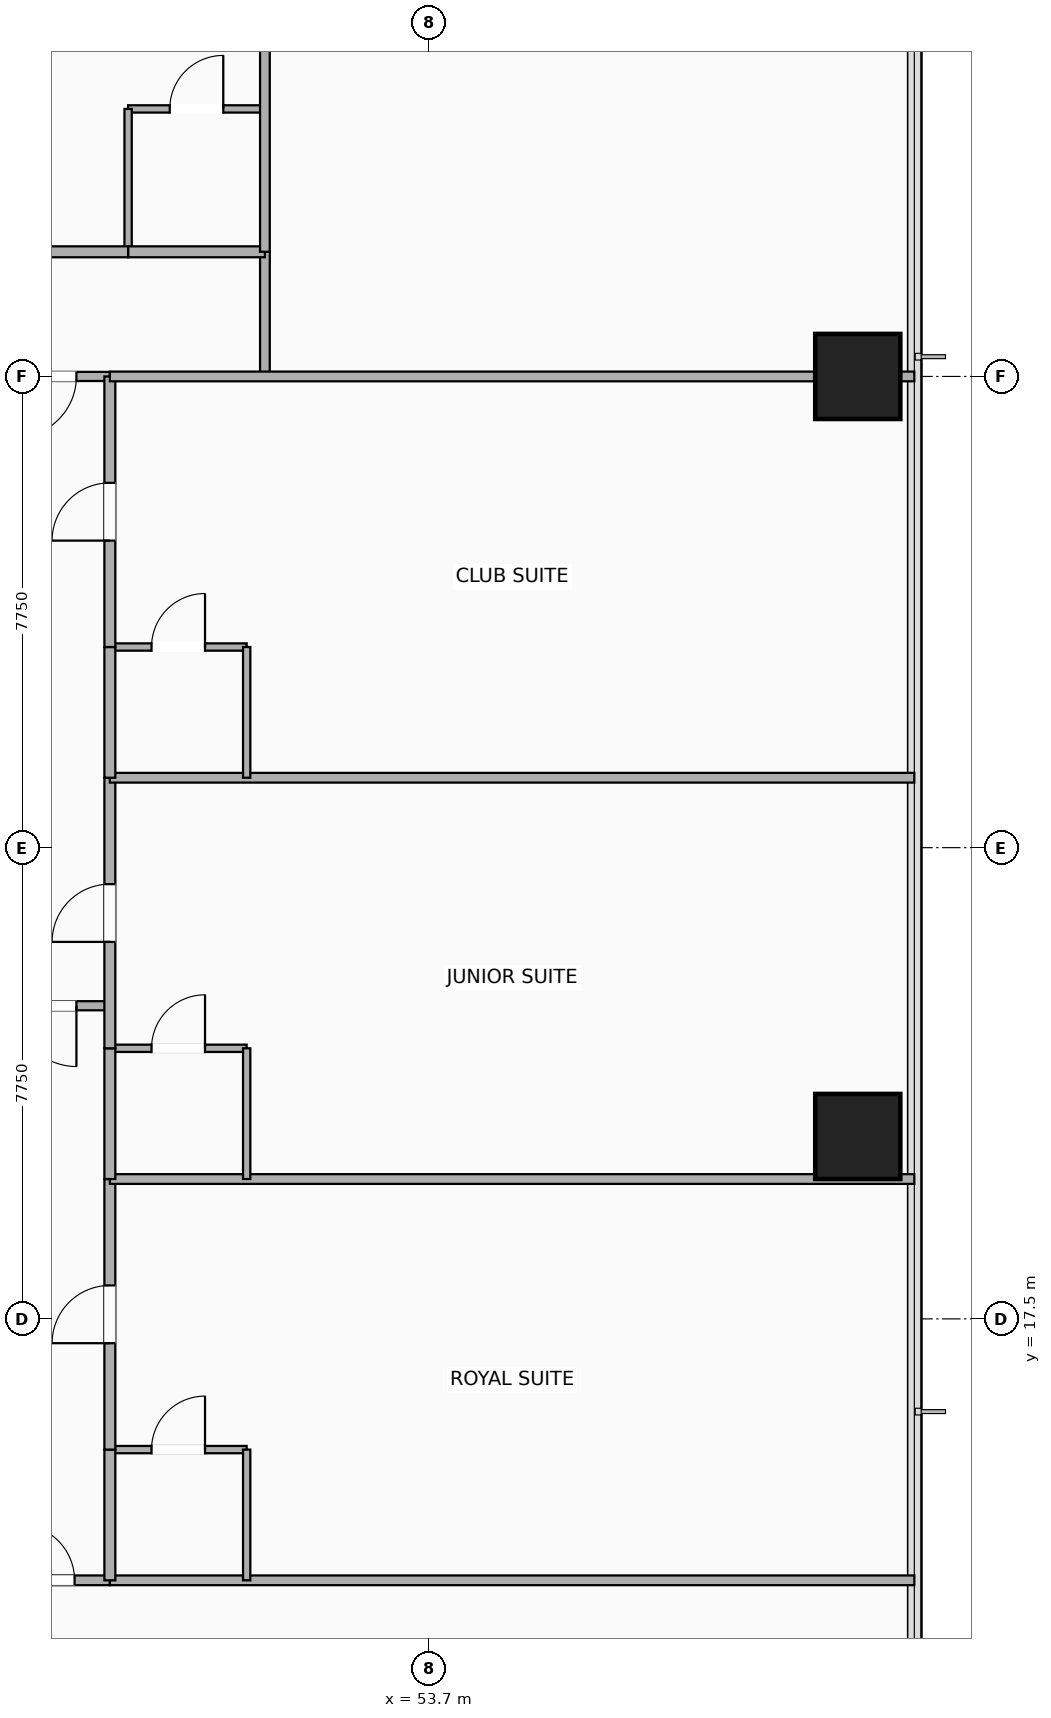
"""IFC4 building model, lengths in metres.
Left out: names, types, materials, properties, quantities, classifications, styles, units other than length and angle.
Written with IfcOpenShell. Run it as: python <this file> out.ifc"""

import sys

from ifc_helpers import new_model, si_unit, direction, frame, frame_2d, origin, origin_2d, place, context, subcontext, project, spatial, rectangle, extrude, element, fill, save


model = new_model("IFC4")
c1 = context("Model", 3, precision=1e-05, world=origin(), true_north=direction((0.0, 1.0)))
c2 = subcontext(c1, "Body", "Model", "MODEL_VIEW")
j1 = project(units=[si_unit("LENGTHUNIT", "METRE"), si_unit("PLANEANGLEUNIT", "RADIAN")], contexts=[c1])
p1 = place(None, origin())
s1 = spatial("IfcSite", under=j1, at=p1, CompositionType="ELEMENT")
p2 = place(p1, origin())
s2 = spatial("IfcBuilding", under=s1, at=p2, CompositionType="ELEMENT")
p3 = place(p2, frame((0.0, 0.0, 71.9)))
s3 = spatial("IfcBuildingStorey", under=s2, at=p3, CompositionType="ELEMENT", Elevation=71.9)
for number, where, z_axis, x_axis in (
    (1, (60.75, 20.5, -0.28), (0.0, 0.0, 1.0), (1.0, 0.0, 0.0)),
    (2, (60.75, 33.0, -0.28), (0.0, 0.0, 1.0), (1.0, 0.0, 0.0)),
):
    element("IfcColumn", number, at=place(p3, frame(where, z_axis=z_axis, x_axis=x_axis)), inside=s3, PredefinedType="COLUMN", context=c2, shape_type="SweptSolid", body=[
        extrude(rectangle(XDim=1.4, YDim=1.4, at=origin_2d()), origin(), (0.0, 0.0, 1.0), 3.46),
    ])
p4 = place(p3, frame((44.8, 13.2, 0.0), z_axis=(0.0, 0.0, 1.0), x_axis=(1.0, 0.0, 0.0)))
e3 = element("IfcWall", 3, at=p4, inside=s3, PredefinedType="PARTITIONING", context=c2, shape_type="SweptSolid", body=[
    extrude(rectangle(XDim=3.65, YDim=0.16, at=frame_2d((1.825, 0.0))), origin(), (0.0, 0.0, 1.0), 2.47),
])
p5 = place(p4, frame((3.07, 0.0, 0.0), z_axis=(0.0, 0.0, 1.0), x_axis=(-1.0, 0.0, 0.0)))
e4 = element("IfcOpeningElement", 4, at=p5, cuts=e3, PredefinedType="OPENING", context=c2, shape_type="SweptSolid", body=[
    extrude(rectangle(XDim=0.92, YDim=2.08, at=frame_2d((0.46, 1.04))), frame((0.0, 0.09, 0.0), z_axis=(0.0, -1.0, 0.0), x_axis=(1.0, 0.0, 0.0)), (0.0, 0.0, 1.0), 0.18),
])
p6 = place(p3, frame((46.45, 22.65, 0.0), z_axis=(0.0, 0.0, 1.0), x_axis=(1.0, 0.0, 0.0)))
e5 = element("IfcWall", 5, at=p6, inside=s3, PredefinedType="PARTITIONING", context=c2, shape_type="SweptSolid", body=[
    extrude(rectangle(XDim=2.0, YDim=0.15, at=frame_2d((1.0, 0.0))), origin(), (0.0, 0.0, 1.0), 3.18),
])
p7 = place(p6, frame((0.45, 0.0, 0.0)))
e6 = element("IfcOpeningElement", 6, at=p7, cuts=e5, PredefinedType="OPENING", context=c2, shape_type="SweptSolid", body=[
    extrude(rectangle(XDim=1.0, YDim=2.15, at=frame_2d((0.5, 1.075))), frame((0.0, 0.085, 0.0), z_axis=(0.0, -1.0, 0.0), x_axis=(1.0, 0.0, 0.0)), (0.0, 0.0, 1.0), 0.17),
])
p8 = place(p3, frame((46.45, 33.0, 0.0), z_axis=(0.0, 0.0, 1.0), x_axis=(1.0, 0.0, 0.0)))
e7 = element("IfcWall", 7, at=p8, inside=s3, PredefinedType="PARTITIONING", context=c2, shape_type="SweptSolid", body=[
    extrude(rectangle(XDim=2.0, YDim=0.15, at=frame_2d((1.0, 0.0))), origin(), (0.0, 0.0, 1.0), 2.47),
])
p9 = place(p8, frame((0.45, 0.0, 0.0)))
e8 = element("IfcOpeningElement", 8, at=p9, cuts=e7, PredefinedType="OPENING", context=c2, shape_type="SweptSolid", body=[
    extrude(rectangle(XDim=1.0, YDim=2.15, at=frame_2d((0.5, 1.075))), frame((0.0, 0.085, 0.0), z_axis=(0.0, -1.0, 0.0), x_axis=(1.0, 0.0, 0.0)), (0.0, 0.0, 1.0), 0.17),
])
p10 = place(p3, frame((51.0, 33.0, 0.0), z_axis=(0.0, 0.0, 1.0), x_axis=(0.0, 1.0, 0.0)))
e9 = element("IfcWall", 9, at=p10, inside=s3, PredefinedType="PARTITIONING", context=c2, shape_type="SweptSolid", body=[
    extrude(rectangle(XDim=2.05, YDim=0.16, at=frame_2d((1.025, 0.0))), origin(), (0.0, 0.0, 1.0), 2.47),
])
p11 = place(p3, frame((48.75, 37.4, 0.0), z_axis=(0.0, 0.0, 1.0), x_axis=(1.0, 0.0, 0.0)))
e10 = element("IfcWall", 10, at=p11, inside=s3, PredefinedType="PARTITIONING", context=c2, shape_type="SweptSolid", body=[
    extrude(rectangle(XDim=2.25, YDim=0.12, at=frame_2d((1.125, 0.0))), origin(), (0.0, 0.0, 1.0), 3.18),
])
p12 = place(p11, frame((1.565, 0.0, 0.0), z_axis=(0.0, 0.0, 1.0), x_axis=(-1.0, 0.0, 0.0)))
e11 = element("IfcOpeningElement", 11, at=p12, cuts=e10, PredefinedType="OPENING", context=c2, shape_type="SweptSolid", body=[
    extrude(rectangle(XDim=0.88, YDim=2.08, at=frame_2d((0.44, 1.04))), frame((0.0, 0.07, 0.0), z_axis=(0.0, -1.0, 0.0), x_axis=(1.0, 0.0, 0.0)), (0.0, 0.0, 1.0), 0.14),
])
p13 = place(p3, frame((48.75, 35.05, 0.0), z_axis=(0.0, 0.0, 1.0), x_axis=(0.0, 1.0, 0.0)))
e12 = element("IfcWall", 12, at=p13, inside=s3, PredefinedType="PARTITIONING", context=c2, shape_type="SweptSolid", body=[
    extrude(rectangle(XDim=2.35, YDim=0.12, at=frame_2d((1.175, 0.0))), origin(), (0.0, 0.0, 1.0), 3.18),
])
p14 = place(p3, frame((48.75, 35.05, 0.0), z_axis=(0.0, 0.0, 1.0), x_axis=(1.0, 0.0, 0.0)))
e13 = element("IfcWall", 13, at=p14, inside=s3, PredefinedType="PARTITIONING", context=c2, shape_type="SweptSolid", body=[
    extrude(rectangle(XDim=2.25, YDim=0.18, at=frame_2d((1.125, 0.0))), origin(), (0.0, 0.0, 1.0), 3.18),
])
p15 = place(p3, frame((40.413, 35.05, 0.0), z_axis=(0.0, 0.0, 1.0), x_axis=(1.0, 0.0, 0.0)))
e14 = element("IfcWall", 14, at=p15, inside=s3, PredefinedType="PARTITIONING", context=c2, shape_type="SweptSolid", body=[
    extrude(rectangle(XDim=8.337, YDim=0.18, at=frame_2d((4.168, 0.0))), origin(), (0.0, 0.0, 1.0), 2.47),
])
p16 = place(p15, frame((3.693, 0.0, 0.0)))
e15 = element("IfcOpeningElement", 15, at=p16, cuts=e14, PredefinedType="OPENING", context=c2, shape_type="SweptSolid", body=[
    extrude(rectangle(XDim=0.95, YDim=2.15, at=frame_2d((0.475, 1.075))), frame((0.0, 0.1, 0.0), z_axis=(0.0, -1.0, 0.0), x_axis=(1.0, 0.0, 0.0)), (0.0, 0.0, 1.0), 0.2),
])
p17 = place(p3, frame((51.0, 35.05, 0.0), z_axis=(0.0, 0.0, 1.0), x_axis=(0.0, 1.0, 0.0)))
e16 = element("IfcWall", 16, at=p17, inside=s3, PredefinedType="PARTITIONING", context=c2, shape_type="SweptSolid", body=[
    extrude(rectangle(XDim=13.33, YDim=0.16, at=frame_2d((6.665, 0.0))), origin(), (0.0, 0.0, 1.0), 3.18),
])
p18 = place(p3, frame((48.45, 13.2, 0.0), z_axis=(0.0, 0.0, 1.0), x_axis=(1.0, 0.0, 0.0)))
e17 = element("IfcWall", 17, at=p18, inside=s3, PredefinedType="PARTITIONING", context=c2, shape_type="SweptSolid", body=[
    extrude(rectangle(XDim=13.23, YDim=0.16, at=frame_2d((6.615, 0.0))), origin(), (0.0, 0.0, 1.0), 2.543),
])
p19 = place(p3, frame((48.45, 15.35, 0.0), z_axis=(0.0, 0.0, 1.0), x_axis=(1.0, 0.0, 0.0)))
e18 = element("IfcWall", 18, at=p19, inside=s3, PredefinedType="PARTITIONING", context=c2, shape_type="SweptSolid", body=[
    extrude(rectangle(XDim=2.25, YDim=0.12, at=frame_2d((1.125, 0.0))), origin(), (0.0, 0.0, 1.0), 3.18),
])
p20 = place(p19, frame((1.565, 0.0, 0.0), z_axis=(0.0, 0.0, 1.0), x_axis=(-1.0, 0.0, 0.0)))
e19 = element("IfcOpeningElement", 19, at=p20, cuts=e18, PredefinedType="OPENING", context=c2, shape_type="SweptSolid", body=[
    extrude(rectangle(XDim=0.88, YDim=2.08, at=frame_2d((0.44, 1.04))), frame((0.0, 0.07, 0.0), z_axis=(0.0, -1.0, 0.0), x_axis=(1.0, 0.0, 0.0)), (0.0, 0.0, 1.0), 0.14),
])
p21 = place(p3, frame((50.7, 13.2, 0.0), z_axis=(0.0, 0.0, 1.0), x_axis=(0.0, 1.0, 0.0)))
e20 = element("IfcWall", 20, at=p21, inside=s3, PredefinedType="PARTITIONING", context=c2, shape_type="SweptSolid", body=[
    extrude(rectangle(XDim=2.15, YDim=0.12, at=frame_2d((1.075, 0.0))), origin(), (0.0, 0.0, 1.0), 2.862),
])
p22 = place(p3, frame((48.45, 13.2, 0.0), z_axis=(0.0, 0.0, 1.0), x_axis=(0.0, 1.0, 0.0)))
e21 = element("IfcWall", 21, at=p22, inside=s3, PredefinedType="PARTITIONING", context=c2, shape_type="SweptSolid", body=[
    extrude(rectangle(XDim=2.15, YDim=0.18, at=frame_2d((1.075, 0.0))), origin(), (0.0, 0.0, 1.0), 2.862),
])
p23 = place(p3, frame((48.45, 15.35, 0.0), z_axis=(0.0, 0.0, 1.0), x_axis=(0.0, 1.0, 0.0)))
e22 = element("IfcWall", 22, at=p23, inside=s3, PredefinedType="PARTITIONING", context=c2, shape_type="SweptSolid", body=[
    extrude(rectangle(XDim=4.45, YDim=0.18, at=frame_2d((2.225, 0.0))), origin(), (0.0, 0.0, 1.0), 2.862),
])
p24 = place(p23, frame((2.7, 0.0, 0.0), z_axis=(0.0, 0.0, 1.0), x_axis=(-1.0, 0.0, 0.0)))
e23 = element("IfcOpeningElement", 23, at=p24, cuts=e22, PredefinedType="OPENING", context=c2, shape_type="SweptSolid", body=[
    extrude(rectangle(XDim=0.95, YDim=2.15, at=frame_2d((0.475, 1.075))), frame((0.0, 0.1, 0.0), z_axis=(0.0, -1.0, 0.0), x_axis=(1.0, 0.0, 0.0)), (0.0, 0.0, 1.0), 0.2),
])
p25 = place(p3, frame((48.45, 19.8, 0.0), z_axis=(0.0, 0.0, 1.0), x_axis=(1.0, 0.0, 0.0)))
e24 = element("IfcWall", 24, at=p25, inside=s3, PredefinedType="PARTITIONING", context=c2, shape_type="SweptSolid", body=[
    extrude(rectangle(XDim=13.23, YDim=0.16, at=frame_2d((6.615, 0.0))), origin(), (0.0, 0.0, 1.0), 2.543),
])
p26 = place(p3, frame((48.45, 21.95, 0.0), z_axis=(0.0, 0.0, 1.0), x_axis=(1.0, 0.0, 0.0)))
e25 = element("IfcWall", 25, at=p26, inside=s3, PredefinedType="PARTITIONING", context=c2, shape_type="SweptSolid", body=[
    extrude(rectangle(XDim=2.25, YDim=0.12, at=frame_2d((1.125, 0.0))), origin(), (0.0, 0.0, 1.0), 3.18),
])
p27 = place(p26, frame((1.565, 0.0, 0.0), z_axis=(0.0, 0.0, 1.0), x_axis=(-1.0, 0.0, 0.0)))
e26 = element("IfcOpeningElement", 26, at=p27, cuts=e25, PredefinedType="OPENING", context=c2, shape_type="SweptSolid", body=[
    extrude(rectangle(XDim=0.88, YDim=2.08, at=frame_2d((0.44, 1.04))), frame((0.0, 0.07, 0.0), z_axis=(0.0, -1.0, 0.0), x_axis=(1.0, 0.0, 0.0)), (0.0, 0.0, 1.0), 0.14),
])
p28 = place(p3, frame((50.7, 19.8, 0.0), z_axis=(0.0, 0.0, 1.0), x_axis=(0.0, 1.0, 0.0)))
e27 = element("IfcWall", 27, at=p28, inside=s3, PredefinedType="PARTITIONING", context=c2, shape_type="SweptSolid", body=[
    extrude(rectangle(XDim=2.15, YDim=0.12, at=frame_2d((1.075, 0.0))), origin(), (0.0, 0.0, 1.0), 2.47),
])
p29 = place(p3, frame((48.45, 19.8, 0.0), z_axis=(0.0, 0.0, 1.0), x_axis=(0.0, 1.0, 0.0)))
e28 = element("IfcWall", 28, at=p29, inside=s3, PredefinedType="PARTITIONING", context=c2, shape_type="SweptSolid", body=[
    extrude(rectangle(XDim=2.15, YDim=0.18, at=frame_2d((1.075, 0.0))), origin(), (0.0, 0.0, 1.0), 2.47),
])
p30 = place(p3, frame((48.45, 21.95, 0.0), z_axis=(0.0, 0.0, 1.0), x_axis=(0.0, 1.0, 0.0)))
e29 = element("IfcWall", 29, at=p30, inside=s3, PredefinedType="PARTITIONING", context=c2, shape_type="SweptSolid", body=[
    extrude(rectangle(XDim=4.45, YDim=0.18, at=frame_2d((2.225, 0.0))), origin(), (0.0, 0.0, 1.0), 2.748),
])
p31 = place(p30, frame((2.7, 0.0, 0.0), z_axis=(0.0, 0.0, 1.0), x_axis=(-1.0, 0.0, 0.0)))
e30 = element("IfcOpeningElement", 30, at=p31, cuts=e29, PredefinedType="OPENING", context=c2, shape_type="SweptSolid", body=[
    extrude(rectangle(XDim=0.95, YDim=2.15, at=frame_2d((0.475, 1.075))), frame((0.0, 0.1, 0.0), z_axis=(0.0, -1.0, 0.0), x_axis=(1.0, 0.0, 0.0)), (0.0, 0.0, 1.0), 0.2),
])
p32 = place(p3, frame((48.45, 26.4, 0.0), z_axis=(0.0, 0.0, 1.0), x_axis=(1.0, 0.0, 0.0)))
e31 = element("IfcWall", 31, at=p32, inside=s3, PredefinedType="PARTITIONING", context=c2, shape_type="SweptSolid", body=[
    extrude(rectangle(XDim=13.23, YDim=0.16, at=frame_2d((6.615, 0.0))), origin(), (0.0, 0.0, 1.0), 2.543),
])
p33 = place(p3, frame((48.45, 28.55, 0.0), z_axis=(0.0, 0.0, 1.0), x_axis=(1.0, 0.0, 0.0)))
e32 = element("IfcWall", 32, at=p33, inside=s3, PredefinedType="PARTITIONING", context=c2, shape_type="SweptSolid", body=[
    extrude(rectangle(XDim=2.25, YDim=0.12, at=frame_2d((1.125, 0.0))), origin(), (0.0, 0.0, 1.0), 3.18),
])
p34 = place(p33, frame((1.565, 0.0, 0.0), z_axis=(0.0, 0.0, 1.0), x_axis=(-1.0, 0.0, 0.0)))
e33 = element("IfcOpeningElement", 33, at=p34, cuts=e32, PredefinedType="OPENING", context=c2, shape_type="SweptSolid", body=[
    extrude(rectangle(XDim=0.88, YDim=2.08, at=frame_2d((0.44, 1.04))), frame((0.0, 0.07, 0.0), z_axis=(0.0, -1.0, 0.0), x_axis=(1.0, 0.0, 0.0)), (0.0, 0.0, 1.0), 0.14),
])
p35 = place(p3, frame((50.7, 26.4, 0.0), z_axis=(0.0, 0.0, 1.0), x_axis=(0.0, 1.0, 0.0)))
e34 = element("IfcWall", 34, at=p35, inside=s3, PredefinedType="PARTITIONING", context=c2, shape_type="SweptSolid", body=[
    extrude(rectangle(XDim=2.15, YDim=0.12, at=frame_2d((1.075, 0.0))), origin(), (0.0, 0.0, 1.0), 3.18),
])
p36 = place(p3, frame((48.45, 26.4, 0.0), z_axis=(0.0, 0.0, 1.0), x_axis=(0.0, 1.0, 0.0)))
e35 = element("IfcWall", 35, at=p36, inside=s3, PredefinedType="PARTITIONING", context=c2, shape_type="SweptSolid", body=[
    extrude(rectangle(XDim=2.15, YDim=0.18, at=frame_2d((1.075, 0.0))), origin(), (0.0, 0.0, 1.0), 3.18),
])
p37 = place(p3, frame((48.45, 28.55, 0.0), z_axis=(0.0, 0.0, 1.0), x_axis=(0.0, 1.0, 0.0)))
e36 = element("IfcWall", 36, at=p37, inside=s3, PredefinedType="PARTITIONING", context=c2, shape_type="SweptSolid", body=[
    extrude(rectangle(XDim=4.45, YDim=0.18, at=frame_2d((2.225, 0.0))), origin(), (0.0, 0.0, 1.0), 2.47),
])
p38 = place(p37, frame((2.7, 0.0, 0.0), z_axis=(0.0, 0.0, 1.0), x_axis=(-1.0, 0.0, 0.0)))
e37 = element("IfcOpeningElement", 37, at=p38, cuts=e36, PredefinedType="OPENING", context=c2, shape_type="SweptSolid", body=[
    extrude(rectangle(XDim=0.95, YDim=2.15, at=frame_2d((0.475, 1.075))), frame((0.0, 0.1, 0.0), z_axis=(0.0, -1.0, 0.0), x_axis=(1.0, 0.0, 0.0)), (0.0, 0.0, 1.0), 0.2),
])
p39 = place(p3, frame((48.45, 33.0, 0.0), z_axis=(0.0, 0.0, 1.0), x_axis=(1.0, 0.0, 0.0)))
e38 = element("IfcWall", 38, at=p39, inside=s3, PredefinedType="PARTITIONING", context=c2, shape_type="SweptSolid", body=[
    extrude(rectangle(XDim=13.23, YDim=0.16, at=frame_2d((6.615, 0.0))), origin(), (0.0, 0.0, 1.0), 2.47),
])
p40 = place(p5, origin())
e39 = element("IfcDoor", 39, at=p40, inside=s3, OperationType="SINGLE_SWING_LEFT", PredefinedType="DOOR", context=c2, shape_type="SweptSolid", body=[
    extrude(rectangle(XDim=0.92, YDim=2.08, at=frame_2d((0.46, 1.04))), frame((0.0, 0.025, 0.0), z_axis=(0.0, -1.0, 0.0), x_axis=(1.0, 0.0, 0.0)), (0.0, 0.0, 1.0), 0.05),
])
fill(e4, e39)
p41 = place(p7, origin())
e40 = element("IfcDoor", 40, at=p41, inside=s3, OperationType="SINGLE_SWING_RIGHT", PredefinedType="DOOR", context=c2, shape_type="SweptSolid", body=[
    extrude(rectangle(XDim=1.0, YDim=2.15, at=frame_2d((0.5, 1.075))), frame((0.0, 0.025, 0.0), z_axis=(0.0, -1.0, 0.0), x_axis=(1.0, 0.0, 0.0)), (0.0, 0.0, 1.0), 0.05),
])
fill(e6, e40)
p42 = place(p9, origin())
e41 = element("IfcDoor", 41, at=p42, inside=s3, OperationType="SINGLE_SWING_LEFT", PredefinedType="DOOR", context=c2, shape_type="SweptSolid", body=[
    extrude(rectangle(XDim=1.0, YDim=2.15, at=frame_2d((0.5, 1.075))), frame((0.0, 0.025, 0.0), z_axis=(0.0, -1.0, 0.0), x_axis=(1.0, 0.0, 0.0)), (0.0, 0.0, 1.0), 0.05),
])
fill(e8, e41)
p43 = place(p12, origin())
e42 = element("IfcDoor", 42, at=p43, inside=s3, OperationType="SINGLE_SWING_RIGHT", PredefinedType="DOOR", context=c2, shape_type="SweptSolid", body=[
    extrude(rectangle(XDim=0.88, YDim=2.08, at=frame_2d((0.44, 1.04))), frame((0.0, 0.025, 0.0), z_axis=(0.0, -1.0, 0.0), x_axis=(1.0, 0.0, 0.0)), (0.0, 0.0, 1.0), 0.05),
])
fill(e11, e42)
p44 = place(p20, origin())
e43 = element("IfcDoor", 43, at=p44, inside=s3, OperationType="SINGLE_SWING_RIGHT", PredefinedType="DOOR", context=c2, shape_type="SweptSolid", body=[
    extrude(rectangle(XDim=0.88, YDim=2.08, at=frame_2d((0.44, 1.04))), frame((0.0, 0.025, 0.0), z_axis=(0.0, -1.0, 0.0), x_axis=(1.0, 0.0, 0.0)), (0.0, 0.0, 1.0), 0.05),
])
fill(e19, e43)
p45 = place(p24, origin())
e44 = element("IfcDoor", 44, at=p45, inside=s3, OperationType="SINGLE_SWING_LEFT", PredefinedType="DOOR", context=c2, shape_type="SweptSolid", body=[
    extrude(rectangle(XDim=0.95, YDim=2.15, at=frame_2d((0.475, 1.075))), frame((0.0, 0.025, 0.0), z_axis=(0.0, -1.0, 0.0), x_axis=(1.0, 0.0, 0.0)), (0.0, 0.0, 1.0), 0.05),
])
fill(e23, e44)
p46 = place(p27, origin())
e45 = element("IfcDoor", 45, at=p46, inside=s3, OperationType="SINGLE_SWING_RIGHT", PredefinedType="DOOR", context=c2, shape_type="SweptSolid", body=[
    extrude(rectangle(XDim=0.88, YDim=2.08, at=frame_2d((0.44, 1.04))), frame((0.0, 0.025, 0.0), z_axis=(0.0, -1.0, 0.0), x_axis=(1.0, 0.0, 0.0)), (0.0, 0.0, 1.0), 0.05),
])
fill(e26, e45)
p47 = place(p31, origin())
e46 = element("IfcDoor", 46, at=p47, inside=s3, OperationType="SINGLE_SWING_LEFT", PredefinedType="DOOR", context=c2, shape_type="SweptSolid", body=[
    extrude(rectangle(XDim=0.95, YDim=2.15, at=frame_2d((0.475, 1.075))), frame((0.0, 0.025, 0.0), z_axis=(0.0, -1.0, 0.0), x_axis=(1.0, 0.0, 0.0)), (0.0, 0.0, 1.0), 0.05),
])
fill(e30, e46)
p48 = place(p34, origin())
e47 = element("IfcDoor", 47, at=p48, inside=s3, OperationType="SINGLE_SWING_RIGHT", PredefinedType="DOOR", context=c2, shape_type="SweptSolid", body=[
    extrude(rectangle(XDim=0.88, YDim=2.08, at=frame_2d((0.44, 1.04))), frame((0.0, 0.025, 0.0), z_axis=(0.0, -1.0, 0.0), x_axis=(1.0, 0.0, 0.0)), (0.0, 0.0, 1.0), 0.05),
])
fill(e33, e47)
p49 = place(p38, origin())
e48 = element("IfcDoor", 48, at=p49, inside=s3, OperationType="SINGLE_SWING_LEFT", PredefinedType="DOOR", context=c2, shape_type="SweptSolid", body=[
    extrude(rectangle(XDim=0.95, YDim=2.15, at=frame_2d((0.475, 1.075))), frame((0.0, 0.025, 0.0), z_axis=(0.0, -1.0, 0.0), x_axis=(1.0, 0.0, 0.0)), (0.0, 0.0, 1.0), 0.05),
])
fill(e37, e48)
save(model, sys.argv[1])
